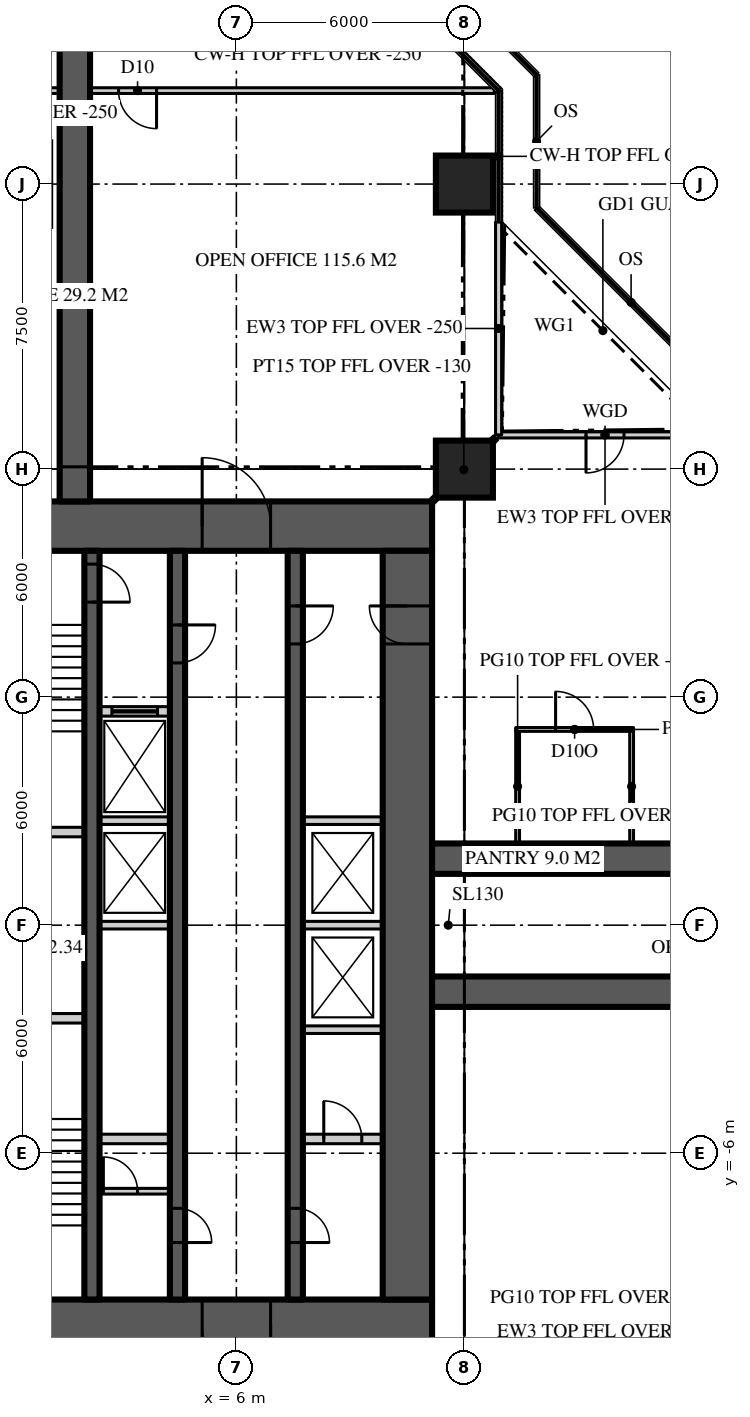
"""IFC4 building model, lengths in metres.
Left out: names, types, materials, properties, quantities, classifications, styles, units other than length and angle.
Written with IfcOpenShell. Run it as: python <this file> out.ifc"""

import sys

from ifc_helpers import new_model, si_unit, direction, frame, frame_2d, origin, origin_2d, place, context, subcontext, project, spatial, rectangle, extrude, element, fill, save


model = new_model("IFC4")
c1 = context("Model", 3, precision=1e-05, world=origin(), true_north=direction((0.0, 1.0)))
c2 = subcontext(c1, "Body", "Model", "MODEL_VIEW")
j1 = project(units=[si_unit("LENGTHUNIT", "METRE"), si_unit("PLANEANGLEUNIT", "RADIAN")], contexts=[c1])
p1 = place(None, origin())
s1 = spatial("IfcSite", under=j1, at=p1, CompositionType="ELEMENT")
p2 = place(p1, origin())
s2 = spatial("IfcBuilding", under=s1, at=p2, CompositionType="ELEMENT")
p3 = place(p2, frame((0.0, 0.0, 263.4)))
s3 = spatial("IfcBuildingStorey", under=s2, at=p3, CompositionType="ELEMENT", Elevation=263.4)
p4 = place(p3, frame((-11.15, 10.5, 0.0), z_axis=(0.0, 0.0, 1.0), x_axis=(1.0, 0.0, 0.0)))
e1 = element("IfcWall", 1, at=p4, inside=s3, PredefinedType="SHEAR", context=c2, shape_type="SweptSolid", body=[
    extrude(rectangle(XDim=22.3, YDim=1.3, at=frame_2d((11.15, 0.0))), origin(), (0.0, 0.0, 1.0), 3.9),
])
p5 = place(p4, frame((4.25, 0.0, 0.0)))
e2 = element("IfcOpeningElement", 2, at=p5, cuts=e1, PredefinedType="OPENING", context=c2, shape_type="SweptSolid", body=[
    extrude(rectangle(XDim=1.8, YDim=2.2, at=frame_2d((0.9, 1.1))), frame((0.0, 0.66, 0.0), z_axis=(0.0, -1.0, 0.0), x_axis=(1.0, 0.0, 0.0)), (0.0, 0.0, 1.0), 1.32),
])
p6 = place(p4, frame((16.25, 0.0, 0.0)))
e3 = element("IfcOpeningElement", 3, at=p6, cuts=e1, PredefinedType="OPENING", context=c2, shape_type="SweptSolid", body=[
    extrude(rectangle(XDim=1.8, YDim=2.2, at=frame_2d((0.9, 1.1))), frame((0.0, 0.66, 0.0), z_axis=(0.0, -1.0, 0.0), x_axis=(1.0, 0.0, 0.0)), (0.0, 0.0, 1.0), 1.32),
])
p7 = place(p3, frame((11.15, -10.5, 0.0), z_axis=(0.0, 0.0, 1.0), x_axis=(-1.0, 0.0, 0.0)))
e4 = element("IfcWall", 4, at=p7, inside=s3, PredefinedType="SHEAR", context=c2, shape_type="SweptSolid", body=[
    extrude(rectangle(XDim=22.3, YDim=1.3, at=frame_2d((11.15, 0.0))), origin(), (0.0, 0.0, 1.0), 3.9),
])
p8 = place(p7, frame((16.25, 0.0, 0.0)))
e5 = element("IfcOpeningElement", 5, at=p8, cuts=e4, PredefinedType="OPENING", context=c2, shape_type="SweptSolid", body=[
    extrude(rectangle(XDim=1.8, YDim=2.2, at=frame_2d((0.9, 1.1))), frame((0.0, 0.66, 0.0), z_axis=(0.0, -1.0, 0.0), x_axis=(1.0, 0.0, 0.0)), (0.0, 0.0, 1.0), 1.32),
])
p9 = place(p7, frame((4.25, 0.0, 0.0)))
e6 = element("IfcOpeningElement", 6, at=p9, cuts=e4, PredefinedType="OPENING", context=c2, shape_type="SweptSolid", body=[
    extrude(rectangle(XDim=1.8, YDim=2.2, at=frame_2d((0.9, 1.1))), frame((0.0, 0.66, 0.0), z_axis=(0.0, -1.0, 0.0), x_axis=(1.0, 0.0, 0.0)), (0.0, 0.0, 1.0), 1.32),
])
p10 = place(p3, frame((10.5, -9.85, 0.0), z_axis=(0.0, 0.0, 1.0), x_axis=(0.0, 1.0, 0.0)))
e7 = element("IfcWall", 7, at=p10, inside=s3, PredefinedType="SHEAR", context=c2, shape_type="SweptSolid", body=[
    extrude(rectangle(XDim=19.7, YDim=1.3, at=frame_2d((9.85, 0.0))), origin(), (0.0, 0.0, 1.0), 3.9),
])
p11 = place(p10, frame((17.25, 0.0, 0.0)))
e8 = element("IfcOpeningElement", 8, at=p11, cuts=e7, PredefinedType="OPENING", context=c2, shape_type="SweptSolid", body=[
    extrude(rectangle(XDim=1.0, YDim=2.2, at=frame_2d((0.5, 1.1))), frame((0.0, 0.66, 0.0), z_axis=(0.0, -1.0, 0.0), x_axis=(1.0, 0.0, 0.0)), (0.0, 0.0, 1.0), 1.32),
])
for number, where, z_axis, x_axis in (
    (9, (11.15, -1.75, 0.0), (0.0, 0.0, 1.0), (1.0, 0.0, 0.0)),
    (10, (11.15, 1.75, 0.0), (0.0, 0.0, 1.0), (1.0, 0.0, 0.0)),
    (11, (1.75, 11.15, 0.0), (0.0, 0.0, 1.0), (0.0, 1.0, 0.0)),
):
    element("IfcWall", number, at=place(p3, frame(where, z_axis=z_axis, x_axis=x_axis)), inside=s3, PredefinedType="SHEAR", context=c2, shape_type="SweptSolid", body=[
        extrude(rectangle(XDim=15.25, YDim=0.8, at=frame_2d((7.625, 0.0))), origin(), (0.0, 0.0, 1.0), 3.9),
    ])
for number, where, z_axis, x_axis in (
    (12, (12.0, 12.0, 0.0), (0.0, 0.0, 1.0), (1.0, 0.0, 0.0)),
    (13, (12.0, 19.5, 0.0), (0.0, 0.0, 1.0), (1.0, 0.0, 0.0)),
):
    element("IfcColumn", number, at=place(p3, frame(where, z_axis=z_axis, x_axis=x_axis)), inside=s3, PredefinedType="COLUMN", context=c2, shape_type="SweptSolid", body=[
        extrude(rectangle(XDim=1.5, YDim=1.5, at=origin_2d()), origin(), (0.0, 0.0, 1.0), 3.9),
    ])
p12 = place(p3, frame((18.5, 12.9, 0.0), z_axis=(0.0, 0.0, 1.0), x_axis=(-1.0, 0.0, 0.0)))
e14 = element("IfcWall", 14, at=p12, inside=s3, PredefinedType="SOLIDWALL", context=c2, shape_type="SweptSolid", body=[
    extrude(rectangle(XDim=5.6, YDim=0.16, at=frame_2d((2.8, 0.0))), origin(), (0.0, 0.0, 1.0), 3.77),
])
p13 = place(p12, frame((2.3, 0.0, 0.0)))
e15 = element("IfcOpeningElement", 15, at=p13, cuts=e14, PredefinedType="OPENING", context=c2, shape_type="SweptSolid", body=[
    extrude(rectangle(XDim=1.0, YDim=2.2, at=frame_2d((0.5, 1.1))), frame((0.0, 0.09, 0.0), z_axis=(0.0, -1.0, 0.0), x_axis=(1.0, 0.0, 0.0)), (0.0, 0.0, 1.0), 0.18),
])
p14 = place(p3, frame((12.9, 12.9, 0.0), z_axis=(0.0, 0.0, 1.0), x_axis=(0.0, 1.0, 0.0)))
e16 = element("IfcWall", 16, at=p14, inside=s3, PredefinedType="SOLIDWALL", context=c2, shape_type="SweptSolid", body=[
    extrude(rectangle(XDim=5.6, YDim=0.16, at=frame_2d((2.8, 0.0))), origin(), (0.0, 0.0, 1.0), 3.65),
])
p15 = place(p3, frame((7.55, 9.85, 0.0), z_axis=(0.0, 0.0, 1.0), x_axis=(0.0, -1.0, 0.0)))
e17 = element("IfcWall", 17, at=p15, inside=s3, PredefinedType="SHEAR", context=c2, shape_type="SweptSolid", body=[
    extrude(rectangle(XDim=19.7, YDim=0.4, at=frame_2d((9.85, 0.0))), origin(), (0.0, 0.0, 1.0), 3.9),
])
p16 = place(p15, frame((1.45, 0.0, 0.0)))
e18 = element("IfcOpeningElement", 18, at=p16, cuts=e17, PredefinedType="OPENING", context=c2, shape_type="SweptSolid", body=[
    extrude(rectangle(XDim=1.0, YDim=2.2, at=frame_2d((0.5, 1.1))), frame((0.0, 0.21, 0.0), z_axis=(0.0, -1.0, 0.0), x_axis=(1.0, 0.0, 0.0)), (0.0, 0.0, 1.0), 0.42),
])
p17 = place(p15, frame((17.3, 0.0, 0.0)))
e19 = element("IfcOpeningElement", 19, at=p17, cuts=e17, PredefinedType="OPENING", context=c2, shape_type="SweptSolid", body=[
    extrude(rectangle(XDim=0.9, YDim=2.1, at=frame_2d((0.45, 1.05))), frame((0.0, 0.21, 0.0), z_axis=(0.0, -1.0, 0.0), x_axis=(1.0, 0.0, 0.0)), (0.0, 0.0, 1.0), 0.42),
])
p18 = place(p3, frame((4.45, 9.85, 0.0), z_axis=(0.0, 0.0, 1.0), x_axis=(0.0, -1.0, 0.0)))
e20 = element("IfcWall", 20, at=p18, inside=s3, PredefinedType="SHEAR", context=c2, shape_type="SweptSolid", body=[
    extrude(rectangle(XDim=19.7, YDim=0.4, at=frame_2d((9.85, 0.0))), origin(), (0.0, 0.0, 1.0), 3.9),
])
p19 = place(p18, frame((1.95, 0.0, 0.0)))
e21 = element("IfcOpeningElement", 21, at=p19, cuts=e20, PredefinedType="OPENING", context=c2, shape_type="SweptSolid", body=[
    extrude(rectangle(XDim=1.0, YDim=2.2, at=frame_2d((0.5, 1.1))), frame((0.0, 0.21, 0.0), z_axis=(0.0, -1.0, 0.0), x_axis=(1.0, 0.0, 0.0)), (0.0, 0.0, 1.0), 0.42),
])
p20 = place(p18, frame((17.3, 0.0, 0.0)))
e22 = element("IfcOpeningElement", 22, at=p20, cuts=e20, PredefinedType="OPENING", context=c2, shape_type="SweptSolid", body=[
    extrude(rectangle(XDim=0.9, YDim=2.1, at=frame_2d((0.45, 1.05))), frame((0.0, 0.21, 0.0), z_axis=(0.0, -1.0, 0.0), x_axis=(1.0, 0.0, 0.0)), (0.0, 0.0, 1.0), 0.42),
])
p21 = place(p3, frame((2.2, 9.85, 0.0), z_axis=(0.0, 0.0, 1.0), x_axis=(0.0, -1.0, 0.0)))
e23 = element("IfcWall", 23, at=p21, inside=s3, PredefinedType="SHEAR", context=c2, shape_type="SweptSolid", body=[
    extrude(rectangle(XDim=19.7, YDim=0.4, at=frame_2d((9.85, 0.0))), origin(), (0.0, 0.0, 1.0), 3.9),
])
p22 = place(p21, frame((0.35, 0.0, 0.0)))
e24 = element("IfcOpeningElement", 24, at=p22, cuts=e23, PredefinedType="OPENING", context=c2, shape_type="SweptSolid", body=[
    extrude(rectangle(XDim=1.0, YDim=2.2, at=frame_2d((0.5, 1.1))), frame((0.0, 0.21, 0.0), z_axis=(0.0, -1.0, 0.0), x_axis=(1.0, 0.0, 0.0)), (0.0, 0.0, 1.0), 0.42),
])
p23 = place(p3, frame((2.4, 5.625, 0.0), z_axis=(0.0, 0.0, 1.0), x_axis=(1.0, 0.0, 0.0)))
e25 = element("IfcWall", 25, at=p23, inside=s3, PredefinedType="SOLIDWALL", context=c2, shape_type="SweptSolid", body=[
    extrude(rectangle(XDim=1.85, YDim=0.25, at=frame_2d((0.925, 0.0))), origin(), (0.0, 0.0, 1.0), 3.7),
])
p24 = place(p23, frame((0.325, 0.0, 0.0)))
e26 = element("IfcOpeningElement", 26, at=p24, cuts=e25, PredefinedType="OPENING", context=c2, shape_type="SweptSolid", body=[
    extrude(rectangle(XDim=1.2, YDim=2.2, at=frame_2d((0.6, 1.1))), frame((0.0, 0.135, 0.0), z_axis=(0.0, -1.0, 0.0), x_axis=(1.0, 0.0, 0.0)), (0.0, 0.0, 1.0), 0.27),
])
p25 = place(p3, frame((2.4, -5.625, 0.0), z_axis=(0.0, 0.0, 1.0), x_axis=(1.0, 0.0, 0.0)))
e27 = element("IfcWall", 27, at=p25, inside=s3, PredefinedType="SOLIDWALL", context=c2, shape_type="SweptSolid", body=[
    extrude(rectangle(XDim=1.85, YDim=0.25, at=frame_2d((0.925, 0.0))), origin(), (0.0, 0.0, 1.0), 3.7),
])
p26 = place(p3, frame((7.75, -5.625, 0.0), z_axis=(0.0, 0.0, 1.0), x_axis=(1.0, 0.0, 0.0)))
e28 = element("IfcWall", 28, at=p26, inside=s3, PredefinedType="SOLIDWALL", context=c2, shape_type="SweptSolid", body=[
    extrude(rectangle(XDim=2.1, YDim=0.25, at=frame_2d((1.05, 0.0))), origin(), (0.0, 0.0, 1.0), 3.7),
])
p27 = place(p26, frame((0.55, 0.0, 0.0)))
e29 = element("IfcOpeningElement", 29, at=p27, cuts=e28, PredefinedType="OPENING", context=c2, shape_type="SweptSolid", body=[
    extrude(rectangle(XDim=1.0, YDim=2.2, at=frame_2d((0.5, 1.1))), frame((0.0, 0.135, 0.0), z_axis=(0.0, -1.0, 0.0), x_axis=(1.0, 0.0, 0.0)), (0.0, 0.0, 1.0), 0.27),
])
for number, where, z_axis, x_axis in (
    (30, (-2.0, -2.45, 0.0), (0.0, 0.0, 1.0), (1.0, 0.0, 0.0)),
    (31, (-2.0, 2.45, 0.0), (0.0, 0.0, 1.0), (1.0, 0.0, 0.0)),
):
    element("IfcWall", number, at=place(p3, frame(where, z_axis=z_axis, x_axis=x_axis)), inside=s3, PredefinedType="SOLIDWALL", context=c2, shape_type="SweptSolid", body=[
        extrude(rectangle(XDim=4.0, YDim=0.25, at=frame_2d((2.0, 0.0))), origin(), (0.0, 0.0, 1.0), 3.7),
    ])
p28 = place(p3, frame((7.75, -2.75, 0.0), z_axis=(0.0, 0.0, 1.0), x_axis=(1.0, 0.0, 0.0)))
e32 = element("IfcWall", 32, at=p28, inside=s3, PredefinedType="SOLIDWALL", context=c2, shape_type="SweptSolid", body=[
    extrude(rectangle(XDim=2.1, YDim=0.2, at=frame_2d((1.05, 0.0))), origin(), (0.0, 0.0, 1.0), 3.7),
])
p29 = place(p3, frame((2.4, 0.0, 0.0), z_axis=(0.0, 0.0, 1.0), x_axis=(1.0, 0.0, 0.0)))
e33 = element("IfcWall", 33, at=p29, inside=s3, PredefinedType="SOLIDWALL", context=c2, shape_type="SweptSolid", body=[
    extrude(rectangle(XDim=1.85, YDim=0.2, at=frame_2d((0.925, 0.0))), origin(), (0.0, 0.0, 1.0), 3.7),
])
p30 = place(p3, frame((7.75, 0.0, 0.0), z_axis=(0.0, 0.0, 1.0), x_axis=(1.0, 0.0, 0.0)))
e34 = element("IfcWall", 34, at=p30, inside=s3, PredefinedType="SOLIDWALL", context=c2, shape_type="SweptSolid", body=[
    extrude(rectangle(XDim=2.1, YDim=0.2, at=frame_2d((1.05, 0.0))), origin(), (0.0, 0.0, 1.0), 3.7),
])
p31 = place(p3, frame((2.4, 2.75, 0.0), z_axis=(0.0, 0.0, 1.0), x_axis=(1.0, 0.0, 0.0)))
e35 = element("IfcWall", 35, at=p31, inside=s3, PredefinedType="SOLIDWALL", context=c2, shape_type="SweptSolid", body=[
    extrude(rectangle(XDim=1.85, YDim=0.2, at=frame_2d((0.925, 0.0))), origin(), (0.0, 0.0, 1.0), 3.7),
])
p32 = place(p3, frame((7.75, 2.75, 0.0), z_axis=(0.0, 0.0, 1.0), x_axis=(1.0, 0.0, 0.0)))
e36 = element("IfcWall", 36, at=p32, inside=s3, PredefinedType="SOLIDWALL", context=c2, shape_type="SweptSolid", body=[
    extrude(rectangle(XDim=2.1, YDim=0.2, at=frame_2d((1.05, 0.0))), origin(), (0.0, 0.0, 1.0), 3.7),
])
for number, where, z_axis, x_axis in (
    (37, (13.4, 2.15, 0.0), (0.0, 0.0, 1.0), (0.0, 1.0, 0.0)),
    (38, (16.4, 2.15, 0.0), (0.0, 0.0, 1.0), (0.0, 1.0, 0.0)),
):
    element("IfcWall", number, at=place(p3, frame(where, z_axis=z_axis, x_axis=x_axis)), inside=s3, PredefinedType="PARTITIONING", context=c2, shape_type="SweptSolid", body=[
        extrude(rectangle(XDim=3.0, YDim=0.1, at=frame_2d((1.5, 0.0))), origin(), (0.0, 0.0, 1.0), 3.77),
    ])
p33 = place(p3, frame((13.35, 5.15, 0.0), z_axis=(0.0, 0.0, 1.0), x_axis=(1.0, 0.0, 0.0)))
e39 = element("IfcWall", 39, at=p33, inside=s3, PredefinedType="PARTITIONING", context=c2, shape_type="SweptSolid", body=[
    extrude(rectangle(XDim=3.1, YDim=0.1, at=frame_2d((1.55, 0.0))), origin(), (0.0, 0.0, 1.0), 3.77),
])
p34 = place(p33, frame((1.05, 0.0, 0.0)))
e40 = element("IfcOpeningElement", 40, at=p34, cuts=e39, PredefinedType="OPENING", context=c2, shape_type="SweptSolid", body=[
    extrude(rectangle(XDim=1.0, YDim=2.2, at=frame_2d((0.5, 1.1))), frame((0.0, 0.06, 0.0), z_axis=(0.0, -1.0, 0.0), x_axis=(1.0, 0.0, 0.0)), (0.0, 0.0, 1.0), 0.12),
])
p35 = place(p3, frame((12.786, 21.959, 0.0), z_axis=(0.0, 0.0, 1.0), x_axis=(-1.0, 0.0, 0.0)))
e41 = element("IfcWall", 41, at=p35, inside=s3, PredefinedType="PARTITIONING", context=c2, shape_type="SweptSolid", body=[
    extrude(rectangle(XDim=25.573, YDim=0.15, at=frame_2d((12.786, 0.0))), origin(), (0.0, 0.0, 1.0), 3.65),
])
p36 = place(p35, frame((15.687, 0.0, 0.0)))
e42 = element("IfcOpeningElement", 42, at=p36, cuts=e41, PredefinedType="OPENING", context=c2, shape_type="SweptSolid", body=[
    extrude(rectangle(XDim=1.0, YDim=2.2, at=frame_2d((0.5, 1.1))), frame((0.0, 0.085, 0.0), z_axis=(0.0, -1.0, 0.0), x_axis=(1.0, 0.0, 0.0)), (0.0, 0.0, 1.0), 0.17),
])
p37 = place(p35, frame((8.886, 0.0, 0.0)))
e43 = element("IfcOpeningElement", 43, at=p37, cuts=e41, PredefinedType="OPENING", context=c2, shape_type="SweptSolid", body=[
    extrude(rectangle(XDim=1.0, YDim=2.2, at=frame_2d((0.5, 1.1))), frame((0.0, 0.085, 0.0), z_axis=(0.0, -1.0, 0.0), x_axis=(1.0, 0.0, 0.0)), (0.0, 0.0, 1.0), 0.17),
])
p38 = place(p3, frame((11.15, 11.15, 0.0), z_axis=(0.0, 0.0, 1.0), x_axis=(0.707106781187, 0.707106781187, 0.0)))
e44 = element("IfcWall", 44, at=p38, inside=s3, PredefinedType="PARTITIONING", context=c2, shape_type="SweptSolid", body=[
    extrude(rectangle(XDim=2.362, YDim=0.15, at=frame_2d((1.181, 0.0))), origin(), (0.0, 0.0, 1.0), 3.77),
])
p39 = place(p3, frame((2.4, -7.0, 0.0), z_axis=(0.0, 0.0, 1.0), x_axis=(1.0, 0.0, 0.0)))
e45 = element("IfcWall", 45, at=p39, inside=s3, PredefinedType="SOLIDWALL", context=c2, shape_type="SweptSolid", body=[
    extrude(rectangle(XDim=1.85, YDim=0.15, at=frame_2d((0.925, 0.0))), origin(), (0.0, 0.0, 1.0), 3.77),
])
p40 = place(p39, frame((0.1, 0.0, 0.0)))
e46 = element("IfcOpeningElement", 46, at=p40, cuts=e45, PredefinedType="OPENING", context=c2, shape_type="SweptSolid", body=[
    extrude(rectangle(XDim=0.9, YDim=2.1, at=frame_2d((0.45, 1.05))), frame((0.0, 0.085, 0.0), z_axis=(0.0, -1.0, 0.0), x_axis=(1.0, 0.0, 0.0)), (0.0, 0.0, 1.0), 0.17),
])
p41 = place(p13, origin())
e47 = element("IfcDoor", 47, at=p41, inside=s3, OperationType="SINGLE_SWING_RIGHT", PredefinedType="DOOR", context=c2, shape_type="SweptSolid", body=[
    extrude(rectangle(XDim=1.0, YDim=2.2, at=frame_2d((0.5, 1.1))), frame((0.0, 0.025, 0.0), z_axis=(0.0, -1.0, 0.0), x_axis=(1.0, 0.0, 0.0)), (0.0, 0.0, 1.0), 0.05),
])
fill(e15, e47)
p42 = place(p6, origin())
e48 = element("IfcDoor", 48, at=p42, inside=s3, OperationType="DOUBLE_DOOR_DOUBLE_SWING", PredefinedType="DOOR", context=c2, shape_type="SweptSolid", body=[
    extrude(rectangle(XDim=1.8, YDim=2.2, at=frame_2d((0.9, 1.1))), frame((0.0, 0.025, 0.0), z_axis=(0.0, -1.0, 0.0), x_axis=(1.0, 0.0, 0.0)), (0.0, 0.0, 1.0), 0.05),
])
fill(e3, e48)
p43 = place(p9, origin())
e49 = element("IfcDoor", 49, at=p43, inside=s3, OperationType="DOUBLE_DOOR_DOUBLE_SWING", PredefinedType="DOOR", context=c2, shape_type="SweptSolid", body=[
    extrude(rectangle(XDim=1.8, YDim=2.2, at=frame_2d((0.9, 1.1))), frame((0.0, 0.025, 0.0), z_axis=(0.0, -1.0, 0.0), x_axis=(1.0, 0.0, 0.0)), (0.0, 0.0, 1.0), 0.05),
])
fill(e6, e49)
p44 = place(p16, origin())
e50 = element("IfcDoor", 50, at=p44, inside=s3, OperationType="SINGLE_SWING_LEFT", PredefinedType="DOOR", context=c2, shape_type="SweptSolid", body=[
    extrude(rectangle(XDim=1.0, YDim=2.2, at=frame_2d((0.5, 1.1))), frame((0.0, 0.025, 0.0), z_axis=(0.0, -1.0, 0.0), x_axis=(1.0, 0.0, 0.0)), (0.0, 0.0, 1.0), 0.05),
])
fill(e18, e50)
p45 = place(p11, origin())
e51 = element("IfcDoor", 51, at=p45, inside=s3, OperationType="SINGLE_SWING_RIGHT", PredefinedType="DOOR", context=c2, shape_type="SweptSolid", body=[
    extrude(rectangle(XDim=1.0, YDim=2.2, at=frame_2d((0.5, 1.1))), frame((0.0, 0.025, 0.0), z_axis=(0.0, -1.0, 0.0), x_axis=(1.0, 0.0, 0.0)), (0.0, 0.0, 1.0), 0.05),
])
fill(e8, e51)
p46 = place(p19, origin())
e52 = element("IfcDoor", 52, at=p46, inside=s3, OperationType="SINGLE_SWING_LEFT", PredefinedType="DOOR", context=c2, shape_type="SweptSolid", body=[
    extrude(rectangle(XDim=1.0, YDim=2.2, at=frame_2d((0.5, 1.1))), frame((0.0, 0.025, 0.0), z_axis=(0.0, -1.0, 0.0), x_axis=(1.0, 0.0, 0.0)), (0.0, 0.0, 1.0), 0.05),
])
fill(e21, e52)
p47 = place(p22, origin())
e53 = element("IfcDoor", 53, at=p47, inside=s3, OperationType="SINGLE_SWING_RIGHT", PredefinedType="DOOR", context=c2, shape_type="SweptSolid", body=[
    extrude(rectangle(XDim=1.0, YDim=2.2, at=frame_2d((0.5, 1.1))), frame((0.0, 0.025, 0.0), z_axis=(0.0, -1.0, 0.0), x_axis=(1.0, 0.0, 0.0)), (0.0, 0.0, 1.0), 0.05),
])
fill(e24, e53)
p48 = place(p17, origin())
e54 = element("IfcDoor", 54, at=p48, inside=s3, OperationType="SINGLE_SWING_RIGHT", PredefinedType="DOOR", context=c2, shape_type="SweptSolid", body=[
    extrude(rectangle(XDim=0.9, YDim=2.1, at=frame_2d((0.45, 1.05))), frame((0.0, 0.025, 0.0), z_axis=(0.0, -1.0, 0.0), x_axis=(1.0, 0.0, 0.0)), (0.0, 0.0, 1.0), 0.05),
])
fill(e19, e54)
p49 = place(p20, origin())
e55 = element("IfcDoor", 55, at=p49, inside=s3, OperationType="SINGLE_SWING_RIGHT", PredefinedType="DOOR", context=c2, shape_type="SweptSolid", body=[
    extrude(rectangle(XDim=0.9, YDim=2.1, at=frame_2d((0.45, 1.05))), frame((0.0, 0.025, 0.0), z_axis=(0.0, -1.0, 0.0), x_axis=(1.0, 0.0, 0.0)), (0.0, 0.0, 1.0), 0.05),
])
fill(e22, e55)
p50 = place(p24, origin())
e56 = element("IfcDoor", 56, at=p50, inside=s3, OperationType="SLIDING_TO_LEFT", PredefinedType="DOOR", context=c2, shape_type="SweptSolid", body=[
    extrude(rectangle(XDim=1.2, YDim=2.2, at=frame_2d((0.6, 1.1))), frame((0.0, 0.025, 0.0), z_axis=(0.0, -1.0, 0.0), x_axis=(1.0, 0.0, 0.0)), (0.0, 0.0, 1.0), 0.05),
])
fill(e26, e56)
p51 = place(p34, origin())
e57 = element("IfcDoor", 57, at=p51, inside=s3, OperationType="SINGLE_SWING_LEFT", PredefinedType="DOOR", context=c2, shape_type="SweptSolid", body=[
    extrude(rectangle(XDim=1.0, YDim=2.2, at=frame_2d((0.5, 1.1))), frame((0.0, 0.025, 0.0), z_axis=(0.0, -1.0, 0.0), x_axis=(1.0, 0.0, 0.0)), (0.0, 0.0, 1.0), 0.05),
])
fill(e40, e57)
p52 = place(p37, origin())
e58 = element("IfcDoor", 58, at=p52, inside=s3, OperationType="SINGLE_SWING_LEFT", PredefinedType="DOOR", context=c2, shape_type="SweptSolid", body=[
    extrude(rectangle(XDim=1.0, YDim=2.2, at=frame_2d((0.5, 1.1))), frame((0.0, 0.025, 0.0), z_axis=(0.0, -1.0, 0.0), x_axis=(1.0, 0.0, 0.0)), (0.0, 0.0, 1.0), 0.05),
])
fill(e43, e58)
p53 = place(p27, origin())
e59 = element("IfcDoor", 59, at=p53, inside=s3, OperationType="SINGLE_SWING_LEFT", PredefinedType="DOOR", context=c2, shape_type="SweptSolid", body=[
    extrude(rectangle(XDim=1.0, YDim=2.2, at=frame_2d((0.5, 1.1))), frame((0.0, 0.025, 0.0), z_axis=(0.0, -1.0, 0.0), x_axis=(1.0, 0.0, 0.0)), (0.0, 0.0, 1.0), 0.05),
])
fill(e29, e59)
p54 = place(p40, origin())
e60 = element("IfcDoor", 60, at=p54, inside=s3, OperationType="SINGLE_SWING_LEFT", PredefinedType="DOOR", context=c2, shape_type="SweptSolid", body=[
    extrude(rectangle(XDim=0.9, YDim=2.1, at=frame_2d((0.45, 1.05))), frame((0.0, 0.025, 0.0), z_axis=(0.0, -1.0, 0.0), x_axis=(1.0, 0.0, 0.0)), (0.0, 0.0, 1.0), 0.05),
])
fill(e46, e60)
save(model, sys.argv[1])
